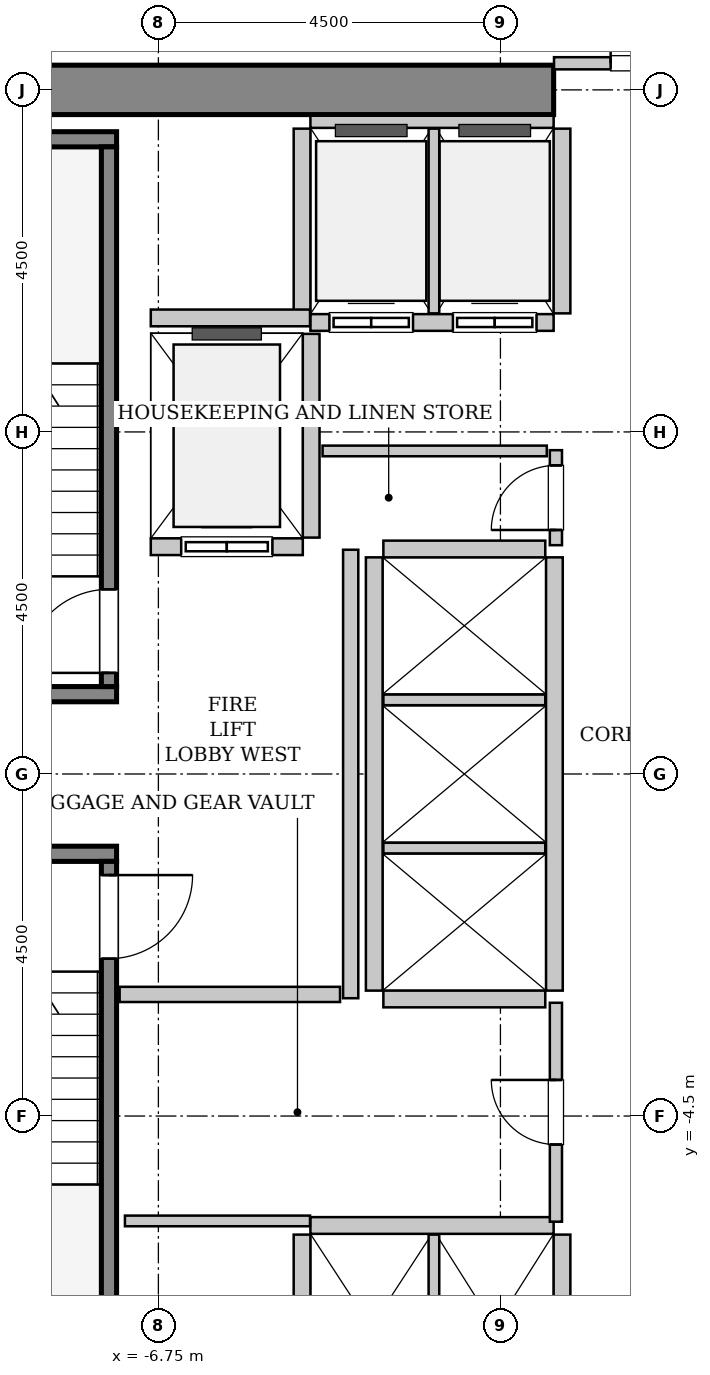
"""IFC4 building model, lengths in metres.
Left out: names, types, materials, properties, quantities, classifications, styles, units other than length and angle.
Written with IfcOpenShell. Run it as: python <this file> out.ifc"""

import sys

from ifc_helpers import new_model, si_unit, direction, frame, frame_2d, origin, place, context, subcontext, project, spatial, rectangle, extrude, source, transform, mapped, element, fill, save


model = new_model("IFC4")
c1 = context("Model", 3, precision=1e-05, world=origin(), true_north=direction((0.0, 1.0)))
c2 = subcontext(c1, "Body", "Model", "MODEL_VIEW")
j1 = project(units=[si_unit("LENGTHUNIT", "METRE"), si_unit("PLANEANGLEUNIT", "RADIAN")], contexts=[c1])
p1 = place(None, origin())
s1 = spatial("IfcSite", under=j1, at=p1, CompositionType="ELEMENT")
p2 = place(p1, origin())
s2 = spatial("IfcBuilding", under=s1, at=p2, CompositionType="ELEMENT")
p3 = place(p2, frame((0.0, 0.0, 52.0)))
s3 = spatial("IfcBuildingStorey", under=s2, at=p3, CompositionType="ELEMENT", Elevation=52.0)
m1 = source(origin(), c2, "Body", "SweptSolid", [
    extrude(rectangle(XDim=10.025, YDim=0.65, at=frame_2d((5.012, 0.0))), origin(), (0.0, 0.0, 1.0), 3.8),
])
p4 = place(p3, frame((-11.575, 9.0, 0.0), z_axis=(0.0, 0.0, 1.0), x_axis=(1.0, 0.0, 0.0)))
e1 = element("IfcWall", 1, at=p4, inside=s3, PredefinedType="SHEAR", context=c2, shape_type="MappedRepresentation", body=[
    mapped(m1, transform((0.0, 0.0, 0.0), x_axis=(1.0, 0.0, 0.0), y_axis=(0.0, 1.0, 0.0), z_axis=(0.0, 0.0, 1.0), scale=1.0)),
])
m2 = source(origin(), c2, "Body", "SweptSolid", [
    extrude(rectangle(XDim=3.4, YDim=0.2, at=frame_2d((1.7, 0.0))), origin(), (0.0, 0.0, 1.0), 3.8),
])
p5 = place(p3, frame((-7.3, 1.05, 0.0), z_axis=(0.0, 0.0, 1.0), x_axis=(-1.0, 0.0, 0.0)))
e2 = element("IfcWall", 2, at=p5, inside=s3, PredefinedType="SOLIDWALL", context=c2, shape_type="MappedRepresentation", body=[
    mapped(m2, transform((0.0, 0.0, 0.0), x_axis=(1.0, 0.0, 0.0), y_axis=(0.0, 1.0, 0.0), z_axis=(0.0, 0.0, 1.0), scale=1.0)),
])
m3 = source(origin(), c2, "Body", "SweptSolid", [
    extrude(rectangle(XDim=3.63, YDim=0.2, at=frame_2d((1.815, 0.0))), origin(), (0.0, 0.0, 1.0), 3.8),
])
p6 = place(p3, frame((-7.3, 8.35, 0.0), z_axis=(0.0, 0.0, 1.0), x_axis=(-1.0, 0.0, 0.0)))
e3 = element("IfcWall", 3, at=p6, inside=s3, PredefinedType="SOLIDWALL", context=c2, shape_type="MappedRepresentation", body=[
    mapped(m3, transform((0.0, 0.0, 0.0), x_axis=(1.0, 0.0, 0.0), y_axis=(0.0, 1.0, 0.0), z_axis=(0.0, 0.0, 1.0), scale=1.0)),
])
m4 = source(origin(), c2, "Body", "SweptSolid", [
    extrude(rectangle(XDim=7.1, YDim=0.2, at=frame_2d((3.55, 0.0))), origin(), (0.0, 0.0, 1.0), 3.8),
])
p7 = place(p3, frame((-7.4, 1.15, 0.0), z_axis=(0.0, 0.0, 1.0), x_axis=(0.0, 1.0, 0.0)))
e4 = element("IfcWall", 4, at=p7, inside=s3, PredefinedType="SOLIDWALL", context=c2, shape_type="MappedRepresentation", body=[
    mapped(m4, transform((0.0, 0.0, 0.0), x_axis=(1.0, 0.0, 0.0), y_axis=(0.0, 1.0, 0.0), z_axis=(0.0, 0.0, 1.0), scale=1.0)),
])
p8 = place(p7, frame((0.18, 0.0, 0.0)))
e5 = element("IfcOpeningElement", 5, at=p8, cuts=e4, PredefinedType="OPENING", context=c2, shape_type="SweptSolid", body=[
    extrude(rectangle(XDim=1.1, YDim=2.15, at=frame_2d((0.55, 1.075))), frame((0.0, 0.11, 0.0), z_axis=(0.0, -1.0, 0.0), x_axis=(1.0, 0.0, 0.0)), (0.0, 0.0, 1.0), 0.22),
])
p9 = place(p3, frame((-10.7, -1.05, 0.0), z_axis=(0.0, 0.0, 1.0), x_axis=(1.0, 0.0, 0.0)))
e6 = element("IfcWall", 6, at=p9, inside=s3, PredefinedType="SOLIDWALL", context=c2, shape_type="MappedRepresentation", body=[
    mapped(m2, transform((0.0, 0.0, 0.0), x_axis=(1.0, 0.0, 0.0), y_axis=(0.0, 1.0, 0.0), z_axis=(0.0, 0.0, 1.0), scale=1.0)),
])
p10 = place(p3, frame((-7.4, -1.15, 0.0), z_axis=(0.0, 0.0, 1.0), x_axis=(0.0, -1.0, 0.0)))
e7 = element("IfcWall", 7, at=p10, inside=s3, PredefinedType="SOLIDWALL", context=c2, shape_type="MappedRepresentation", body=[
    mapped(m4, transform((0.0, 0.0, 0.0), x_axis=(1.0, 0.0, 0.0), y_axis=(0.0, 1.0, 0.0), z_axis=(0.0, 0.0, 1.0), scale=1.0)),
])
p11 = place(p10, frame((0.18, 0.0, 0.0)))
e8 = element("IfcOpeningElement", 8, at=p11, cuts=e7, PredefinedType="OPENING", context=c2, shape_type="SweptSolid", body=[
    extrude(rectangle(XDim=1.1, YDim=2.15, at=frame_2d((0.55, 1.075))), frame((0.0, 0.11, 0.0), z_axis=(0.0, -1.0, 0.0), x_axis=(1.0, 0.0, 0.0)), (0.0, 0.0, 1.0), 0.22),
])
m5 = source(origin(), c2, "Body", "SweptSolid", [
    extrude(rectangle(XDim=2.0, YDim=0.22, at=frame_2d((1.0, 0.0))), origin(), (0.0, 0.0, 1.0), 3.535),
])
p12 = place(p3, frame((-6.85, 2.99, 0.0), z_axis=(0.0, 0.0, 1.0), x_axis=(1.0, 0.0, 0.0)))
e9 = element("IfcWall", 9, at=p12, inside=s3, PredefinedType="SOLIDWALL", context=c2, shape_type="MappedRepresentation", body=[
    mapped(m5, transform((0.0, 0.0, 0.0), x_axis=(1.0, 0.0, 0.0), y_axis=(0.0, 1.0, 0.0), z_axis=(0.0, 0.0, 1.0), scale=1.0)),
])
p13 = place(p12, frame((0.4, 0.0, 0.0)))
e10 = element("IfcOpeningElement", 10, at=p13, cuts=e9, PredefinedType="OPENING", context=c2, shape_type="SweptSolid", body=[
    extrude(rectangle(XDim=1.2, YDim=2.2, at=frame_2d((0.6, 1.1))), frame((0.0, 0.12, 0.0), z_axis=(0.0, -1.0, 0.0), x_axis=(1.0, 0.0, 0.0)), (0.0, 0.0, 1.0), 0.24),
])
m6 = source(origin(), c2, "Body", "SweptSolid", [
    extrude(rectangle(XDim=2.68, YDim=0.22, at=frame_2d((1.34, 0.0))), origin(), (0.0, 0.0, 1.0), 3.535),
])
p14 = place(p3, frame((-4.74, 3.11, 0.0), z_axis=(0.0, 0.0, 1.0), x_axis=(0.0, 1.0, 0.0)))
e11 = element("IfcWall", 11, at=p14, inside=s3, PredefinedType="SOLIDWALL", context=c2, shape_type="MappedRepresentation", body=[
    mapped(m6, transform((0.0, 0.0, 0.0), x_axis=(1.0, 0.0, 0.0), y_axis=(0.0, 1.0, 0.0), z_axis=(0.0, 0.0, 1.0), scale=1.0)),
])
m7 = source(origin(), c2, "Body", "SweptSolid", [
    extrude(rectangle(XDim=3.2, YDim=0.22, at=frame_2d((1.6, 0.0))), origin(), (0.0, 0.0, 1.0), 3.535),
])
p15 = place(p3, frame((-4.75, 5.94, 0.0), z_axis=(0.0, 0.0, 1.0), x_axis=(1.0, 0.0, 0.0)))
e12 = element("IfcWall", 12, at=p15, inside=s3, PredefinedType="SOLIDWALL", context=c2, shape_type="MappedRepresentation", body=[
    mapped(m7, transform((0.0, 0.0, 0.0), x_axis=(1.0, 0.0, 0.0), y_axis=(0.0, 1.0, 0.0), z_axis=(0.0, 0.0, 1.0), scale=1.0)),
])
p16 = place(p15, frame((0.25, 0.0, 0.0)))
e13 = element("IfcOpeningElement", 13, at=p16, cuts=e12, PredefinedType="OPENING", context=c2, shape_type="SweptSolid", body=[
    extrude(rectangle(XDim=1.1, YDim=2.2, at=frame_2d((0.55, 1.1))), frame((0.0, 0.12, 0.0), z_axis=(0.0, -1.0, 0.0), x_axis=(1.0, 0.0, 0.0)), (0.0, 0.0, 1.0), 0.24),
])
p17 = place(p15, frame((1.875, 0.0, 0.0)))
e14 = element("IfcOpeningElement", 14, at=p17, cuts=e12, PredefinedType="OPENING", context=c2, shape_type="SweptSolid", body=[
    extrude(rectangle(XDim=1.1, YDim=2.2, at=frame_2d((0.55, 1.1))), frame((0.0, 0.12, 0.0), z_axis=(0.0, -1.0, 0.0), x_axis=(1.0, 0.0, 0.0)), (0.0, 0.0, 1.0), 0.24),
])
m8 = source(origin(), c2, "Body", "SweptSolid", [
    extrude(rectangle(XDim=3.2, YDim=0.16, at=frame_2d((1.6, 0.0))), origin(), (0.0, 0.0, 1.0), 2.425),
])
p18 = place(p3, frame((-1.55, 8.58, 0.0), z_axis=(0.0, 0.0, 1.0), x_axis=(-1.0, 0.0, 0.0)))
e15 = element("IfcWall", 15, at=p18, inside=s3, PredefinedType="PARTITIONING", context=c2, shape_type="MappedRepresentation", body=[
    mapped(m8, transform((0.0, 0.0, 0.0), x_axis=(1.0, 0.0, 0.0), y_axis=(0.0, 1.0, 0.0), z_axis=(0.0, 0.0, 1.0), scale=1.0)),
])
m9 = source(origin(), c2, "Body", "SweptSolid", [
    extrude(rectangle(XDim=2.43, YDim=0.22, at=frame_2d((1.215, 0.0))), origin(), (0.0, 0.0, 1.0), 3.535),
])
p19 = place(p3, frame((-4.86, 8.49, 0.0), z_axis=(0.0, 0.0, 1.0), x_axis=(0.0, -1.0, 0.0)))
e16 = element("IfcWall", 16, at=p19, inside=s3, PredefinedType="SOLIDWALL", context=c2, shape_type="MappedRepresentation", body=[
    mapped(m9, transform((0.0, 0.0, 0.0), x_axis=(1.0, 0.0, 0.0), y_axis=(0.0, 1.0, 0.0), z_axis=(0.0, 0.0, 1.0), scale=1.0)),
])
m10 = source(origin(), c2, "Body", "SweptSolid", [
    extrude(rectangle(XDim=2.43, YDim=0.14, at=frame_2d((1.215, 0.0))), origin(), (0.0, 0.0, 1.0), 3.535),
])
p20 = place(p3, frame((-3.125, 6.06, 0.0), z_axis=(0.0, 0.0, 1.0), x_axis=(0.0, 1.0, 0.0)))
e17 = element("IfcWall", 17, at=p20, inside=s3, PredefinedType="PARTITIONING", context=c2, shape_type="MappedRepresentation", body=[
    mapped(m10, transform((0.0, 0.0, 0.0), x_axis=(1.0, 0.0, 0.0), y_axis=(0.0, 1.0, 0.0), z_axis=(0.0, 0.0, 1.0), scale=1.0)),
])
p21 = place(p3, frame((-1.44, 6.06, 0.0), z_axis=(0.0, 0.0, 1.0), x_axis=(0.0, 1.0, 0.0)))
e18 = element("IfcWall", 18, at=p21, inside=s3, PredefinedType="SOLIDWALL", context=c2, shape_type="MappedRepresentation", body=[
    mapped(m9, transform((0.0, 0.0, 0.0), x_axis=(1.0, 0.0, 0.0), y_axis=(0.0, 1.0, 0.0), z_axis=(0.0, 0.0, 1.0), scale=1.0)),
])
p22 = place(p3, frame((-1.55, -5.94, 0.0), z_axis=(0.0, 0.0, 1.0), x_axis=(-1.0, 0.0, 0.0)))
e19 = element("IfcWall", 19, at=p22, inside=s3, PredefinedType="SOLIDWALL", context=c2, shape_type="MappedRepresentation", body=[
    mapped(m7, transform((0.0, 0.0, 0.0), x_axis=(1.0, 0.0, 0.0), y_axis=(0.0, 1.0, 0.0), z_axis=(0.0, 0.0, 1.0), scale=1.0)),
])
p23 = place(p3, frame((-4.86, -6.06, 0.0), z_axis=(0.0, 0.0, 1.0), x_axis=(0.0, -1.0, 0.0)))
e20 = element("IfcWall", 20, at=p23, inside=s3, PredefinedType="SOLIDWALL", context=c2, shape_type="MappedRepresentation", body=[
    mapped(m9, transform((0.0, 0.0, 0.0), x_axis=(1.0, 0.0, 0.0), y_axis=(0.0, 1.0, 0.0), z_axis=(0.0, 0.0, 1.0), scale=1.0)),
])
p24 = place(p3, frame((-3.125, -8.49, 0.0), z_axis=(0.0, 0.0, 1.0), x_axis=(0.0, 1.0, 0.0)))
e21 = element("IfcWall", 21, at=p24, inside=s3, PredefinedType="PARTITIONING", context=c2, shape_type="MappedRepresentation", body=[
    mapped(m10, transform((0.0, 0.0, 0.0), x_axis=(1.0, 0.0, 0.0), y_axis=(0.0, 1.0, 0.0), z_axis=(0.0, 0.0, 1.0), scale=1.0)),
])
p25 = place(p3, frame((-1.44, -8.49, 0.0), z_axis=(0.0, 0.0, 1.0), x_axis=(0.0, 1.0, 0.0)))
e22 = element("IfcWall", 22, at=p25, inside=s3, PredefinedType="SOLIDWALL", context=c2, shape_type="MappedRepresentation", body=[
    mapped(m9, transform((0.0, 0.0, 0.0), x_axis=(1.0, 0.0, 0.0), y_axis=(0.0, 1.0, 0.0), z_axis=(0.0, 0.0, 1.0), scale=1.0)),
])
m11 = source(origin(), c2, "Body", "SweptSolid", [
    extrude(rectangle(XDim=5.7, YDim=0.22, at=frame_2d((2.85, 0.0))), origin(), (0.0, 0.0, 1.0), 3.535),
])
for number, where, z_axis, x_axis in (
    (23, (-1.54, -2.85, 0.0), (0.0, 0.0, 1.0), (0.0, 1.0, 0.0)),
    (24, (-3.91, 2.85, 0.0), (0.0, 0.0, 1.0), (0.0, -1.0, 0.0)),
):
    element("IfcWall", number, at=place(p3, frame(where, z_axis=z_axis, x_axis=x_axis)), inside=s3, PredefinedType="SOLIDWALL", context=c2, shape_type="MappedRepresentation", body=[
        mapped(m11, transform((0.0, 0.0, 0.0), x_axis=(1.0, 0.0, 0.0), y_axis=(0.0, 1.0, 0.0), z_axis=(0.0, 0.0, 1.0), scale=1.0)),
    ])
m12 = source(origin(), c2, "Body", "SweptSolid", [
    extrude(rectangle(XDim=2.13, YDim=0.22, at=frame_2d((1.065, 0.0))), origin(), (0.0, 0.0, 1.0), 3.535),
])
p26 = place(p3, frame((-3.79, -2.96, 0.0), z_axis=(0.0, 0.0, 1.0), x_axis=(1.0, 0.0, 0.0)))
e25 = element("IfcWall", 25, at=p26, inside=s3, PredefinedType="SOLIDWALL", context=c2, shape_type="MappedRepresentation", body=[
    mapped(m12, transform((0.0, 0.0, 0.0), x_axis=(1.0, 0.0, 0.0), y_axis=(0.0, 1.0, 0.0), z_axis=(0.0, 0.0, 1.0), scale=1.0)),
])
m13 = source(origin(), c2, "Body", "SweptSolid", [
    extrude(rectangle(XDim=2.13, YDim=0.14, at=frame_2d((1.065, 0.0))), origin(), (0.0, 0.0, 1.0), 3.535),
])
for number, where, z_axis, x_axis in (
    (26, (-3.79, -0.975, 0.0), (0.0, 0.0, 1.0), (1.0, 0.0, 0.0)),
    (27, (-3.79, 0.975, 0.0), (0.0, 0.0, 1.0), (1.0, 0.0, 0.0)),
):
    element("IfcWall", number, at=place(p3, frame(where, z_axis=z_axis, x_axis=x_axis)), inside=s3, PredefinedType="PARTITIONING", context=c2, shape_type="MappedRepresentation", body=[
        mapped(m13, transform((0.0, 0.0, 0.0), x_axis=(1.0, 0.0, 0.0), y_axis=(0.0, 1.0, 0.0), z_axis=(0.0, 0.0, 1.0), scale=1.0)),
    ])
p27 = place(p3, frame((-1.66, 2.96, 0.0), z_axis=(0.0, 0.0, 1.0), x_axis=(-1.0, 0.0, 0.0)))
e28 = element("IfcWall", 28, at=p27, inside=s3, PredefinedType="SOLIDWALL", context=c2, shape_type="MappedRepresentation", body=[
    mapped(m12, transform((0.0, 0.0, 0.0), x_axis=(1.0, 0.0, 0.0), y_axis=(0.0, 1.0, 0.0), z_axis=(0.0, 0.0, 1.0), scale=1.0)),
])
m14 = source(origin(), c2, "Body", "SweptSolid", [
    extrude(rectangle(XDim=2.095, YDim=0.22, at=frame_2d((1.048, 0.0))), origin(), (0.0, 0.0, 1.0), 3.535),
])
p28 = place(p3, frame((-6.85, 6.0, 0.0), z_axis=(0.0, 0.0, 1.0), x_axis=(1.0, 0.0, 0.0)))
e29 = element("IfcWall", 29, at=p28, inside=s3, PredefinedType="SOLIDWALL", context=c2, shape_type="MappedRepresentation", body=[
    mapped(m14, transform((0.0, 0.0, 0.0), x_axis=(1.0, 0.0, 0.0), y_axis=(0.0, 1.0, 0.0), z_axis=(0.0, 0.0, 1.0), scale=1.0)),
])
m15 = source(origin(), c2, "Body", "SweptSolid", [
    extrude(rectangle(XDim=5.9, YDim=0.2, at=frame_2d((2.95, 0.0))), origin(), (0.0, 0.0, 1.0), 3.535),
])
p29 = place(p3, frame((-4.22, -2.95, 0.0), z_axis=(0.0, 0.0, 1.0), x_axis=(0.0, 1.0, 0.0)))
e30 = element("IfcWall", 30, at=p29, inside=s3, PredefinedType="PARTITIONING", context=c2, shape_type="MappedRepresentation", body=[
    mapped(m15, transform((0.0, 0.0, 0.0), x_axis=(1.0, 0.0, 0.0), y_axis=(0.0, 1.0, 0.0), z_axis=(0.0, 0.0, 1.0), scale=1.0)),
])
m16 = source(origin(), c2, "Body", "SweptSolid", [
    extrude(rectangle(XDim=2.9, YDim=0.2, at=frame_2d((1.45, 0.0))), origin(), (0.0, 0.0, 1.0), 3.535),
])
p30 = place(p3, frame((-7.26, -2.9, 0.0), z_axis=(0.0, 0.0, 1.0), x_axis=(1.0, 0.0, 0.0)))
e31 = element("IfcWall", 31, at=p30, inside=s3, PredefinedType="PARTITIONING", context=c2, shape_type="MappedRepresentation", body=[
    mapped(m16, transform((0.0, 0.0, 0.0), x_axis=(1.0, 0.0, 0.0), y_axis=(0.0, 1.0, 0.0), z_axis=(0.0, 0.0, 1.0), scale=1.0)),
])
m17 = source(origin(), c2, "Body", "SweptSolid", [
    extrude(rectangle(XDim=3.09, YDim=0.16, at=frame_2d((1.545, 0.0))), origin(), (0.0, 0.0, 1.0), 2.425),
])
p31 = place(p3, frame((-1.545, 9.35, 0.0), z_axis=(0.0, 0.0, 1.0), x_axis=(1.0, 0.0, 0.0)))
e32 = element("IfcWall", 32, at=p31, inside=s3, PredefinedType="PARTITIONING", context=c2, shape_type="MappedRepresentation", body=[
    mapped(m17, transform((0.0, 0.0, 0.0), x_axis=(1.0, 0.0, 0.0), y_axis=(0.0, 1.0, 0.0), z_axis=(0.0, 0.0, 1.0), scale=1.0)),
])
p32 = place(p31, frame((0.745, 0.0, 0.0)))
e33 = element("IfcOpeningElement", 33, at=p32, cuts=e32, PredefinedType="OPENING", context=c2, shape_type="SweptSolid", body=[
    extrude(rectangle(XDim=1.6, YDim=2.3, at=frame_2d((0.8, 1.15))), frame((0.0, 0.09, 0.0), z_axis=(0.0, -1.0, 0.0), x_axis=(1.0, 0.0, 0.0)), (0.0, 0.0, 1.0), 0.18),
])
m18 = source(origin(), c2, "Body", "SweptSolid", [
    extrude(rectangle(XDim=1.25, YDim=0.16, at=frame_2d((0.625, 0.0))), origin(), (0.0, 0.0, 1.0), 3.535),
])
p33 = place(p3, frame((-1.52, 3.01, 0.0), z_axis=(0.0, 0.0, 1.0), x_axis=(0.0, 1.0, 0.0)))
e34 = element("IfcWall", 34, at=p33, inside=s3, PredefinedType="PARTITIONING", context=c2, shape_type="MappedRepresentation", body=[
    mapped(m18, transform((0.0, 0.0, 0.0), x_axis=(1.0, 0.0, 0.0), y_axis=(0.0, 1.0, 0.0), z_axis=(0.0, 0.0, 1.0), scale=1.0)),
])
p34 = place(p33, frame((0.2, 0.0, 0.0)))
e35 = element("IfcOpeningElement", 35, at=p34, cuts=e34, PredefinedType="OPENING", context=c2, shape_type="SweptSolid", body=[
    extrude(rectangle(XDim=0.85, YDim=2.1, at=frame_2d((0.425, 1.05))), frame((0.0, 0.09, 0.0), z_axis=(0.0, -1.0, 0.0), x_axis=(1.0, 0.0, 0.0)), (0.0, 0.0, 1.0), 0.18),
])
m19 = source(origin(), c2, "Body", "SweptSolid", [
    extrude(rectangle(XDim=2.95, YDim=0.14, at=frame_2d((1.475, 0.0))), origin(), (0.0, 0.0, 1.0), 3.535),
])
p35 = place(p3, frame((-4.59, 4.25, 0.0), z_axis=(0.0, 0.0, 1.0), x_axis=(1.0, 0.0, 0.0)))
e36 = element("IfcWall", 36, at=p35, inside=s3, PredefinedType="PARTITIONING", context=c2, shape_type="MappedRepresentation", body=[
    mapped(m19, transform((0.0, 0.0, 0.0), x_axis=(1.0, 0.0, 0.0), y_axis=(0.0, 1.0, 0.0), z_axis=(0.0, 0.0, 1.0), scale=1.0)),
])
m20 = source(origin(), c2, "Body", "SweptSolid", [
    extrude(rectangle(XDim=2.88, YDim=0.16, at=frame_2d((1.44, 0.0))), origin(), (0.0, 0.0, 1.0), 3.535),
])
p36 = place(p3, frame((-1.52, -5.89, 0.0), z_axis=(0.0, 0.0, 1.0), x_axis=(0.0, 1.0, 0.0)))
e37 = element("IfcWall", 37, at=p36, inside=s3, PredefinedType="PARTITIONING", context=c2, shape_type="MappedRepresentation", body=[
    mapped(m20, transform((0.0, 0.0, 0.0), x_axis=(1.0, 0.0, 0.0), y_axis=(0.0, 1.0, 0.0), z_axis=(0.0, 0.0, 1.0), scale=1.0)),
])
p37 = place(p36, frame((1.015, 0.0, 0.0)))
e38 = element("IfcOpeningElement", 38, at=p37, cuts=e37, PredefinedType="OPENING", context=c2, shape_type="SweptSolid", body=[
    extrude(rectangle(XDim=0.85, YDim=2.1, at=frame_2d((0.425, 1.05))), frame((0.0, 0.09, 0.0), z_axis=(0.0, -1.0, 0.0), x_axis=(1.0, 0.0, 0.0)), (0.0, 0.0, 1.0), 0.18),
])
m21 = source(origin(), c2, "Body", "SweptSolid", [
    extrude(rectangle(XDim=2.435, YDim=0.14, at=frame_2d((1.218, 0.0))), origin(), (0.0, 0.0, 1.0), 3.535),
])
p38 = place(p3, frame((-7.19, -5.88, 0.0), z_axis=(0.0, 0.0, 1.0), x_axis=(1.0, 0.0, 0.0)))
e39 = element("IfcWall", 39, at=p38, inside=s3, PredefinedType="PARTITIONING", context=c2, shape_type="MappedRepresentation", body=[
    mapped(m21, transform((0.0, 0.0, 0.0), x_axis=(1.0, 0.0, 0.0), y_axis=(0.0, 1.0, 0.0), z_axis=(0.0, 0.0, 1.0), scale=1.0)),
])
m22 = source(origin(), c2, "Body", "SweptSolid", [
    extrude(rectangle(XDim=1.1, YDim=2.15, at=frame_2d((0.55, 1.075))), frame((0.0, 0.025, 0.0), z_axis=(0.0, -1.0, 0.0), x_axis=(1.0, 0.0, 0.0)), (0.0, 0.0, 1.0), 0.05),
])
p39 = place(p8, origin())
e40 = element("IfcDoor", 40, at=p39, inside=s3, OperationType="SINGLE_SWING_LEFT", PredefinedType="DOOR", context=c2, shape_type="MappedRepresentation", body=[
    mapped(m22, transform((0.0, 0.0, 0.0), x_axis=(1.0, 0.0, 0.0), y_axis=(0.0, 1.0, 0.0), z_axis=(0.0, 0.0, 1.0), scale=1.0)),
])
fill(e5, e40)
p40 = place(p11, origin())
e41 = element("IfcDoor", 41, at=p40, inside=s3, OperationType="SINGLE_SWING_LEFT", PredefinedType="DOOR", context=c2, shape_type="MappedRepresentation", body=[
    mapped(m22, transform((0.0, 0.0, 0.0), x_axis=(1.0, 0.0, 0.0), y_axis=(0.0, 1.0, 0.0), z_axis=(0.0, 0.0, 1.0), scale=1.0)),
])
fill(e8, e41)
m23 = source(origin(), c2, "Body", "SweptSolid", [
    extrude(rectangle(XDim=1.2, YDim=2.2, at=frame_2d((0.6, 1.1))), frame((0.0, 0.025, 0.0), z_axis=(0.0, -1.0, 0.0), x_axis=(1.0, 0.0, 0.0)), (0.0, 0.0, 1.0), 0.05),
])
p41 = place(p13, origin())
e42 = element("IfcDoor", 42, at=p41, inside=s3, OperationType="SLIDING_TO_LEFT", PredefinedType="DOOR", context=c2, shape_type="MappedRepresentation", body=[
    mapped(m23, transform((0.0, 0.0, 0.0), x_axis=(1.0, 0.0, 0.0), y_axis=(0.0, 1.0, 0.0), z_axis=(0.0, 0.0, 1.0), scale=1.0)),
])
fill(e10, e42)
m24 = source(origin(), c2, "Body", "SweptSolid", [
    extrude(rectangle(XDim=1.1, YDim=2.2, at=frame_2d((0.55, 1.1))), frame((0.0, 0.025, 0.0), z_axis=(0.0, -1.0, 0.0), x_axis=(1.0, 0.0, 0.0)), (0.0, 0.0, 1.0), 0.05),
])
p42 = place(p16, origin())
e43 = element("IfcDoor", 43, at=p42, inside=s3, OperationType="DOUBLE_DOOR_SLIDING", PredefinedType="DOOR", context=c2, shape_type="MappedRepresentation", body=[
    mapped(m24, transform((0.0, 0.0, 0.0), x_axis=(1.0, 0.0, 0.0), y_axis=(0.0, 1.0, 0.0), z_axis=(0.0, 0.0, 1.0), scale=1.0)),
])
fill(e13, e43)
p43 = place(p17, origin())
e44 = element("IfcDoor", 44, at=p43, inside=s3, OperationType="DOUBLE_DOOR_SLIDING", PredefinedType="DOOR", context=c2, shape_type="MappedRepresentation", body=[
    mapped(m24, transform((0.0, 0.0, 0.0), x_axis=(1.0, 0.0, 0.0), y_axis=(0.0, 1.0, 0.0), z_axis=(0.0, 0.0, 1.0), scale=1.0)),
])
fill(e14, e44)
m25 = source(origin(), c2, "Body", "SweptSolid", [
    extrude(rectangle(XDim=1.6, YDim=2.3, at=frame_2d((0.8, 1.15))), frame((0.0, 0.025, 0.0), z_axis=(0.0, -1.0, 0.0), x_axis=(1.0, 0.0, 0.0)), (0.0, 0.0, 1.0), 0.05),
])
p44 = place(p32, origin())
e45 = element("IfcDoor", 45, at=p44, inside=s3, OperationType="DOUBLE_DOOR_SINGLE_SWING", PredefinedType="DOOR", context=c2, shape_type="MappedRepresentation", body=[
    mapped(m25, transform((0.0, 0.0, 0.0), x_axis=(1.0, 0.0, 0.0), y_axis=(0.0, 1.0, 0.0), z_axis=(0.0, 0.0, 1.0), scale=1.0)),
])
fill(e33, e45)
m26 = source(origin(), c2, "Body", "SweptSolid", [
    extrude(rectangle(XDim=0.85, YDim=2.1, at=frame_2d((0.425, 1.05))), frame((0.0, 0.025, 0.0), z_axis=(0.0, -1.0, 0.0), x_axis=(1.0, 0.0, 0.0)), (0.0, 0.0, 1.0), 0.05),
])
p45 = place(p34, origin())
e46 = element("IfcDoor", 46, at=p45, inside=s3, OperationType="SINGLE_SWING_LEFT", PredefinedType="DOOR", context=c2, shape_type="MappedRepresentation", body=[
    mapped(m26, transform((0.0, 0.0, 0.0), x_axis=(1.0, 0.0, 0.0), y_axis=(0.0, 1.0, 0.0), z_axis=(0.0, 0.0, 1.0), scale=1.0)),
])
fill(e35, e46)
p46 = place(p37, origin())
e47 = element("IfcDoor", 47, at=p46, inside=s3, OperationType="SINGLE_SWING_RIGHT", PredefinedType="DOOR", context=c2, shape_type="MappedRepresentation", body=[
    mapped(m26, transform((0.0, 0.0, 0.0), x_axis=(1.0, 0.0, 0.0), y_axis=(0.0, 1.0, 0.0), z_axis=(0.0, 0.0, 1.0), scale=1.0)),
])
fill(e38, e47)
save(model, sys.argv[1])
